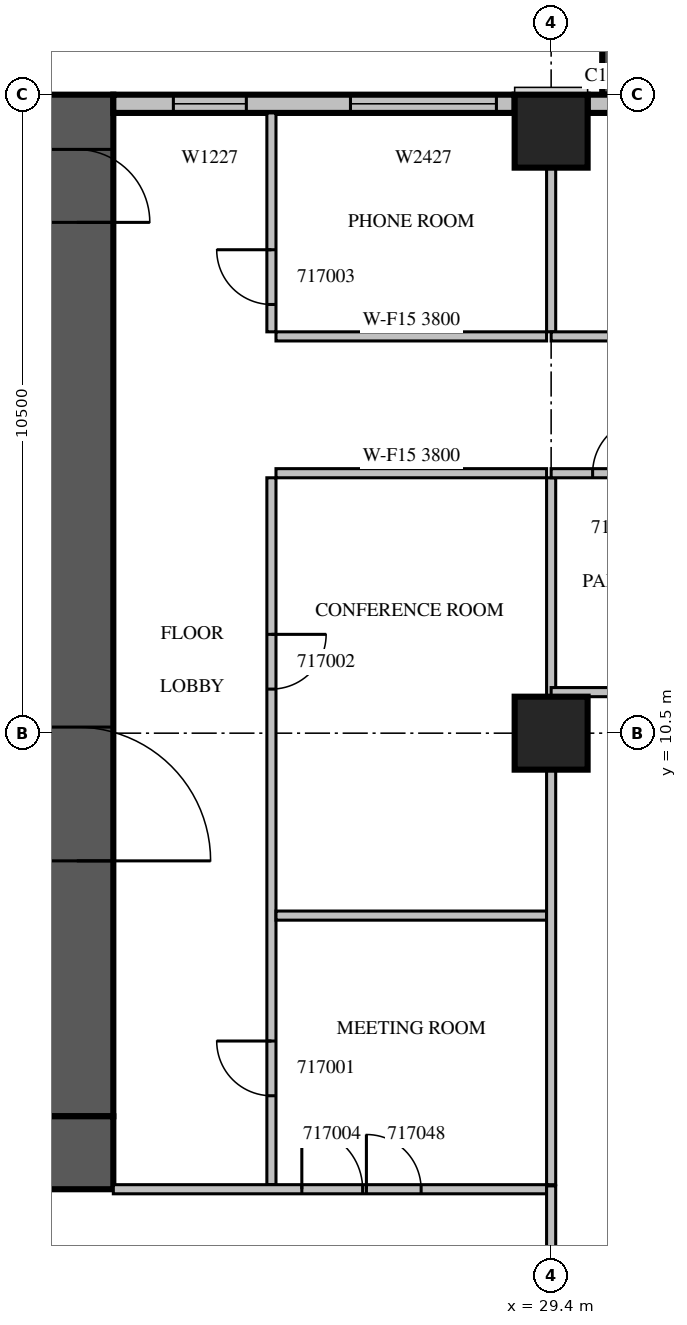
"""IFC4 building model, lengths in metres.
Left out: names, types, materials, properties, quantities, classifications, styles, units other than length and angle.
Written with IfcOpenShell. Run it as: python <this file> out.ifc"""

import sys

from ifc_helpers import new_model, si_unit, direction, frame, frame_2d, origin, origin_2d, place, context, subcontext, project, spatial, rectangle, extrude, source, transform, mapped, element, fill, save


model = new_model("IFC4")
c1 = context("Model", 3, precision=1e-05, world=origin(), true_north=direction((0.0, 1.0)))
c2 = subcontext(c1, "Body", "Model", "MODEL_VIEW")
j1 = project(units=[si_unit("LENGTHUNIT", "METRE"), si_unit("PLANEANGLEUNIT", "RADIAN")], contexts=[c1])
p1 = place(None, origin())
s1 = spatial("IfcSite", under=j1, at=p1, CompositionType="ELEMENT")
p2 = place(p1, origin())
s2 = spatial("IfcBuilding", under=s1, at=p2, CompositionType="ELEMENT")
p3 = place(p2, frame((0.0, 0.0, 82.5)))
s3 = spatial("IfcBuildingStorey", under=s2, at=p3, CompositionType="ELEMENT", Elevation=82.5)
m1 = source(origin(), c2, "Body", "SweptSolid", [
    extrude(rectangle(XDim=1.2, YDim=1.2, at=origin_2d()), origin(), (0.0, 0.0, 1.0), 4.2),
])
for number, where, z_axis, x_axis in (
    (1, (29.4, 10.5, 0.0), (0.0, 0.0, 1.0), (1.0, 0.0, 0.0)),
    (2, (29.4, 20.4, 0.0), (0.0, 0.0, 1.0), (1.0, 0.0, 0.0)),
):
    element("IfcColumn", number, at=place(p3, frame(where, z_axis=z_axis, x_axis=x_axis)), inside=s3, PredefinedType="COLUMN", context=c2, shape_type="MappedRepresentation", body=[
        mapped(m1, transform((0.0, 0.0, 0.0), scale=1.0)),
    ])
m2 = source(origin(), c2, "Body", "SweptSolid", [
    extrude(rectangle(XDim=16.8, YDim=1.2, at=frame_2d((8.4, 0.0))), origin(), (0.0, 0.0, 1.0), 4.2),
])
p4 = place(p3, frame((21.6, 4.2, 0.0), z_axis=(0.0, 0.0, 1.0), x_axis=(0.0, 1.0, 0.0)))
e3 = element("IfcWall", 3, at=p4, inside=s3, PredefinedType="SHEAR", context=c2, shape_type="MappedRepresentation", body=[
    mapped(m2, transform((0.0, 0.0, 0.0), scale=1.0)),
])
m3 = source(origin(), c2, "Body", "SweptSolid", [
    extrude(rectangle(XDim=2.2, YDim=2.1, at=frame_2d((1.1, 1.05))), frame((0.0, 0.61, 0.0), z_axis=(0.0, -1.0, 0.0), x_axis=(1.0, 0.0, 0.0)), (0.0, 0.0, 1.0), 1.22),
])
p5 = place(p4, frame((4.2, 0.0, 0.0)))
e4 = element("IfcOpeningElement", 4, at=p5, cuts=e3, PredefinedType="OPENING", context=c2, shape_type="MappedRepresentation", body=[
    mapped(m3, transform((0.0, 0.0, 0.0), scale=1.0)),
])
m4 = source(origin(), c2, "Body", "SweptSolid", [
    extrude(rectangle(XDim=1.2, YDim=2.1, at=frame_2d((0.6, 1.05))), frame((0.0, 0.61, 0.0), z_axis=(0.0, -1.0, 0.0), x_axis=(1.0, 0.0, 0.0)), (0.0, 0.0, 1.0), 1.22),
])
p6 = place(p4, frame((14.7, 0.0, 0.0)))
e5 = element("IfcOpeningElement", 5, at=p6, cuts=e3, PredefinedType="OPENING", context=c2, shape_type="MappedRepresentation", body=[
    mapped(m4, transform((0.0, 0.0, 0.0), scale=1.0)),
])
m5 = source(origin(), c2, "Body", "SweptSolid", [
    extrude(rectangle(XDim=18.0, YDim=1.2, at=frame_2d((9.0, 0.0))), origin(), (0.0, 0.0, 1.0), 4.2),
])
p7 = place(p3, frame((4.2, 3.6, 0.0), z_axis=(0.0, 0.0, 1.0), x_axis=(1.0, 0.0, 0.0)))
e6 = element("IfcWall", 6, at=p7, inside=s3, PredefinedType="SHEAR", context=c2, shape_type="MappedRepresentation", body=[
    mapped(m5, transform((0.0, 0.0, 0.0), scale=1.0)),
])
m6 = source(origin(), c2, "Body", "SweptSolid", [
    extrude(rectangle(XDim=3.9, YDim=0.2, at=frame_2d((1.95, 0.0))), origin(), (0.0, 0.0, 1.0), 3.8),
])
p8 = place(p3, frame((30.34, 21.0, 0.0), z_axis=(0.0, 0.0, 1.0), x_axis=(0.0, 1.0, 0.0)))
e7 = element("IfcWall", 7, at=p8, inside=s3, PredefinedType="SOLIDWALL", context=c2, shape_type="MappedRepresentation", body=[
    mapped(m6, transform((0.0, 0.0, 0.0), scale=1.0)),
])
m7 = source(origin(), c2, "Body", "SweptSolid", [
    extrude(rectangle(XDim=2.4, YDim=2.7, at=frame_2d((1.2, 1.35))), frame((0.0, 0.11, 0.0), z_axis=(0.0, -1.0, 0.0), x_axis=(1.0, 0.0, 0.0)), (0.0, 0.0, 1.0), 0.22),
])
p9 = place(p8, frame((0.75, 0.0, 0.6)))
e8 = element("IfcOpeningElement", 8, at=p9, cuts=e7, PredefinedType="OPENING", context=c2, shape_type="MappedRepresentation", body=[
    mapped(m7, transform((0.0, 0.0, 0.0), scale=1.0)),
])
m8 = source(origin(), c2, "Body", "SweptSolid", [
    extrude(rectangle(XDim=7.2, YDim=0.3, at=frame_2d((3.6, 0.0))), origin(), (0.0, 0.0, 1.0), 3.8),
])
p10 = place(p3, frame((37.2, 20.85, 0.0), z_axis=(0.0, 0.0, 1.0), x_axis=(-1.0, 0.0, 0.0)))
e9 = element("IfcWall", 9, at=p10, inside=s3, PredefinedType="STANDARD", context=c2, shape_type="MappedRepresentation", body=[
    mapped(m8, transform((0.0, 0.0, 0.0), scale=1.0)),
])
m9 = source(origin(), c2, "Body", "SweptSolid", [
    extrude(rectangle(XDim=1.0, YDim=2.1, at=frame_2d((0.5, 1.05))), frame((0.0, 0.16, 0.0), z_axis=(0.0, -1.0, 0.0), x_axis=(1.0, 0.0, 0.0)), (0.0, 0.0, 1.0), 0.32),
])
p11 = place(p10, frame((5.06, 0.0, 0.0)))
e10 = element("IfcOpeningElement", 10, at=p11, cuts=e9, PredefinedType="OPENING", context=c2, shape_type="MappedRepresentation", body=[
    mapped(m9, transform((0.0, 0.0, 0.0), scale=1.0)),
])
m10 = source(origin(), c2, "Body", "SweptSolid", [
    extrude(rectangle(XDim=6.6, YDim=0.3, at=frame_2d((3.3, 0.0))), origin(), (0.0, 0.0, 1.0), 3.8),
])
p12 = place(p3, frame((28.8, 20.85, 0.0), z_axis=(0.0, 0.0, 1.0), x_axis=(-1.0, 0.0, 0.0)))
e11 = element("IfcWall", 11, at=p12, inside=s3, PredefinedType="STANDARD", context=c2, shape_type="MappedRepresentation", body=[
    mapped(m10, transform((0.0, 0.0, 0.0), scale=1.0)),
])
m11 = source(origin(), c2, "Body", "SweptSolid", [
    extrude(rectangle(XDim=2.4, YDim=2.7, at=frame_2d((1.2, 1.35))), frame((0.0, 0.16, 0.0), z_axis=(0.0, -1.0, 0.0), x_axis=(1.0, 0.0, 0.0)), (0.0, 0.0, 1.0), 0.32),
])
p13 = place(p12, frame((0.3, 0.0, 0.6)))
e12 = element("IfcOpeningElement", 12, at=p13, cuts=e11, PredefinedType="OPENING", context=c2, shape_type="MappedRepresentation", body=[
    mapped(m11, transform((0.0, 0.0, 0.0), scale=1.0)),
])
m12 = source(origin(), c2, "Body", "SweptSolid", [
    extrude(rectangle(XDim=1.2, YDim=2.7, at=frame_2d((0.6, 1.35))), frame((0.0, 0.16, 0.0), z_axis=(0.0, -1.0, 0.0), x_axis=(1.0, 0.0, 0.0)), (0.0, 0.0, 1.0), 0.32),
])
p14 = place(p12, frame((4.412, 0.0, 0.6)))
e13 = element("IfcOpeningElement", 13, at=p14, cuts=e11, PredefinedType="OPENING", context=c2, shape_type="MappedRepresentation", body=[
    mapped(m12, transform((0.0, 0.0, 0.0), scale=1.0)),
])
m13 = source(origin(), c2, "Body", "SweptSolid", [
    extrude(rectangle(XDim=11.625, YDim=0.15, at=frame_2d((5.812, 0.0))), origin(), (0.0, 0.0, 1.0), 3.8),
])
p15 = place(p3, frame((24.8, 14.7, 0.0), z_axis=(0.0, 0.0, 1.0), x_axis=(0.0, -1.0, 0.0)))
e14 = element("IfcWall", 14, at=p15, inside=s3, PredefinedType="PARTITIONING", context=c2, shape_type="MappedRepresentation", body=[
    mapped(m13, transform((0.0, 0.0, 0.0), scale=1.0)),
])
m14 = source(origin(), c2, "Body", "SweptSolid", [
    extrude(rectangle(XDim=0.9, YDim=2.1, at=frame_2d((0.45, 1.05))), frame((0.0, 0.085, 0.0), z_axis=(0.0, -1.0, 0.0), x_axis=(1.0, 0.0, 0.0)), (0.0, 0.0, 1.0), 0.17),
])
p16 = place(p15, frame((9.262, 0.0, 0.0)))
e15 = element("IfcOpeningElement", 15, at=p16, cuts=e14, PredefinedType="OPENING", context=c2, shape_type="MappedRepresentation", body=[
    mapped(m14, transform((0.0, 0.0, 0.0), scale=1.0)),
])
p17 = place(p15, frame((2.575, 0.0, 0.0)))
e16 = element("IfcOpeningElement", 16, at=p17, cuts=e14, PredefinedType="OPENING", context=c2, shape_type="MappedRepresentation", body=[
    mapped(m14, transform((0.0, 0.0, 0.0), scale=1.0)),
])
m15 = source(origin(), c2, "Body", "SweptSolid", [
    extrude(rectangle(XDim=3.6, YDim=0.15, at=frame_2d((1.8, 0.0))), origin(), (0.0, 0.0, 1.0), 3.8),
])
p18 = place(p3, frame((24.8, 20.7, 0.0), z_axis=(0.0, 0.0, 1.0), x_axis=(0.0, -1.0, 0.0)))
e17 = element("IfcWall", 17, at=p18, inside=s3, PredefinedType="PARTITIONING", context=c2, shape_type="MappedRepresentation", body=[
    mapped(m15, transform((0.0, 0.0, 0.0), scale=1.0)),
])
p19 = place(p18, frame((2.25, 0.0, 0.0)))
e18 = element("IfcOpeningElement", 18, at=p19, cuts=e17, PredefinedType="OPENING", context=c2, shape_type="MappedRepresentation", body=[
    mapped(m14, transform((0.0, 0.0, 0.0), scale=1.0)),
])
m16 = source(origin(), c2, "Body", "SweptSolid", [
    extrude(rectangle(XDim=4.45, YDim=0.15, at=frame_2d((2.225, 0.0))), origin(), (0.0, 0.0, 1.0), 3.8),
])
for number, where, z_axis, x_axis in (
    (19, (29.325, 7.5, 0.0), (0.0, 0.0, 1.0), (-1.0, 0.0, 0.0)),
    (20, (29.325, 14.775, 0.0), (0.0, 0.0, 1.0), (-1.0, 0.0, 0.0)),
    (21, (24.875, 17.025, 0.0), (0.0, 0.0, 1.0), (1.0, 0.0, 0.0)),
):
    element("IfcWall", number, at=place(p3, frame(where, z_axis=z_axis, x_axis=x_axis)), inside=s3, PredefinedType="PARTITIONING", context=c2, shape_type="MappedRepresentation", body=[
        mapped(m16, transform((0.0, 0.0, 0.0), scale=1.0)),
    ])
m17 = source(origin(), c2, "Body", "SweptSolid", [
    extrude(rectangle(XDim=6.826, YDim=0.15, at=frame_2d((3.413, 0.0))), origin(), (0.0, 0.0, 1.0), 3.8),
])
p20 = place(p3, frame((29.4, 3.075, 0.0), z_axis=(0.0, 0.0, 1.0), x_axis=(0.0, 1.0, 0.0)))
e22 = element("IfcWall", 22, at=p20, inside=s3, PredefinedType="PARTITIONING", context=c2, shape_type="MappedRepresentation", body=[
    mapped(m17, transform((0.0, 0.0, 0.0), scale=1.0)),
])
m18 = source(origin(), c2, "Body", "SweptSolid", [
    extrude(rectangle(XDim=3.601, YDim=0.15, at=frame_2d((1.8, 0.0))), origin(), (0.0, 0.0, 1.0), 3.8),
])
p21 = place(p3, frame((29.4, 11.099, 0.0), z_axis=(0.0, 0.0, 1.0), x_axis=(0.0, 1.0, 0.0)))
e23 = element("IfcWall", 23, at=p21, inside=s3, PredefinedType="PARTITIONING", context=c2, shape_type="MappedRepresentation", body=[
    mapped(m18, transform((0.0, 0.0, 0.0), scale=1.0)),
])
m19 = source(origin(), c2, "Body", "SweptSolid", [
    extrude(rectangle(XDim=2.701, YDim=0.15, at=frame_2d((1.351, 0.0))), origin(), (0.0, 0.0, 1.0), 3.8),
])
p22 = place(p3, frame((29.4, 17.1, 0.0), z_axis=(0.0, 0.0, 1.0), x_axis=(0.0, 1.0, 0.0)))
e24 = element("IfcWall", 24, at=p22, inside=s3, PredefinedType="PARTITIONING", context=c2, shape_type="MappedRepresentation", body=[
    mapped(m19, transform((0.0, 0.0, 0.0), scale=1.0)),
])
m20 = source(origin(), c2, "Body", "SweptSolid", [
    extrude(rectangle(XDim=7.125, YDim=0.15, at=frame_2d((3.562, 0.0))), origin(), (0.0, 0.0, 1.0), 3.8),
])
p23 = place(p3, frame((22.2, 3.0, 0.0), z_axis=(0.0, 0.0, 1.0), x_axis=(1.0, 0.0, 0.0)))
e25 = element("IfcWall", 25, at=p23, inside=s3, PredefinedType="PARTITIONING", context=c2, shape_type="MappedRepresentation", body=[
    mapped(m20, transform((0.0, 0.0, 0.0), scale=1.0)),
])
m21 = source(origin(), c2, "Body", "SweptSolid", [
    extrude(rectangle(XDim=1.0, YDim=2.1, at=frame_2d((0.5, 1.05))), frame((0.0, 0.085, 0.0), z_axis=(0.0, -1.0, 0.0), x_axis=(1.0, 0.0, 0.0)), (0.0, 0.0, 1.0), 0.17),
])
p24 = place(p23, frame((3.1, 0.0, 0.0)))
e26 = element("IfcOpeningElement", 26, at=p24, cuts=e25, PredefinedType="OPENING", context=c2, shape_type="MappedRepresentation", body=[
    mapped(m21, transform((0.0, 0.0, 0.0), scale=1.0)),
])
p25 = place(p23, frame((4.162, 0.0, 0.0)))
e27 = element("IfcOpeningElement", 27, at=p25, cuts=e25, PredefinedType="OPENING", context=c2, shape_type="MappedRepresentation", body=[
    mapped(m14, transform((0.0, 0.0, 0.0), scale=1.0)),
])
m22 = source(origin(), c2, "Body", "SweptSolid", [
    extrude(rectangle(XDim=1.856, YDim=0.15, at=frame_2d((0.928, 0.0))), origin(), (0.0, 0.0, 1.0), 3.8),
])
p26 = place(p3, frame((29.4, 1.199, 0.0), z_axis=(0.0, 0.0, 1.0), x_axis=(0.0, 1.0, 0.0)))
e28 = element("IfcWall", 28, at=p26, inside=s3, PredefinedType="PARTITIONING", context=c2, shape_type="MappedRepresentation", body=[
    mapped(m22, transform((0.0, 0.0, 0.0), scale=1.0)),
])
m23 = source(origin(), c2, "Body", "SweptSolid", [
    extrude(rectangle(XDim=8.4, YDim=0.15, at=frame_2d((4.2, 0.0))), origin(), (0.0, 0.0, 1.0), 3.8),
])
p27 = place(p3, frame((37.8, 11.175, 0.0), z_axis=(0.0, 0.0, 1.0), x_axis=(-1.0, 0.0, 0.0)))
e29 = element("IfcWall", 29, at=p27, inside=s3, PredefinedType="PARTITIONING", context=c2, shape_type="MappedRepresentation", body=[
    mapped(m23, transform((0.0, 0.0, 0.0), scale=1.0)),
])
m24 = source(origin(), c2, "Body", "SweptSolid", [
    extrude(rectangle(XDim=1.1, YDim=2.1, at=frame_2d((0.55, 1.05))), frame((0.0, 0.085, 0.0), z_axis=(0.0, -1.0, 0.0), x_axis=(1.0, 0.0, 0.0)), (0.0, 0.0, 1.0), 0.17),
])
p28 = place(p27, frame((1.379, 0.0, 0.0)))
e30 = element("IfcOpeningElement", 30, at=p28, cuts=e29, PredefinedType="OPENING", context=c2, shape_type="MappedRepresentation", body=[
    mapped(m24, transform((0.0, 0.0, 0.0), scale=1.0)),
])
p29 = place(p3, frame((37.8, 14.775, 0.0), z_axis=(0.0, 0.0, 1.0), x_axis=(-1.0, 0.0, 0.0)))
e31 = element("IfcWall", 31, at=p29, inside=s3, PredefinedType="PARTITIONING", context=c2, shape_type="MappedRepresentation", body=[
    mapped(m23, transform((0.0, 0.0, 0.0), scale=1.0)),
])
p30 = place(p29, frame((1.115, 0.0, 0.0)))
e32 = element("IfcOpeningElement", 32, at=p30, cuts=e31, PredefinedType="OPENING", context=c2, shape_type="MappedRepresentation", body=[
    mapped(m24, transform((0.0, 0.0, 0.0), scale=1.0)),
])
p31 = place(p29, frame((6.818, 0.0, 0.0)))
e33 = element("IfcOpeningElement", 33, at=p31, cuts=e31, PredefinedType="OPENING", context=c2, shape_type="MappedRepresentation", body=[
    mapped(m14, transform((0.0, 0.0, 0.0), scale=1.0)),
])
p32 = place(p29, frame((4.282, 0.0, 0.0)))
e34 = element("IfcOpeningElement", 34, at=p32, cuts=e31, PredefinedType="OPENING", context=c2, shape_type="MappedRepresentation", body=[
    mapped(m14, transform((0.0, 0.0, 0.0), scale=1.0)),
])
m25 = source(origin(), c2, "Body", "SweptSolid", [
    extrude(rectangle(XDim=37.5, YDim=0.15, at=frame_2d((18.75, 0.0))), origin(), (0.0, 0.0, 1.0), 3.8),
])
p33 = place(p3, frame((29.4, 17.025, 0.0), z_axis=(0.0, 0.0, 1.0), x_axis=(1.0, 0.0, 0.0)))
e35 = element("IfcWall", 35, at=p33, inside=s3, PredefinedType="PARTITIONING", context=c2, shape_type="MappedRepresentation", body=[
    mapped(m25, transform((0.0, 0.0, 0.0), scale=1.0)),
])
p34 = place(p33, frame((1.357, 0.0, 0.0)))
e36 = element("IfcOpeningElement", 36, at=p34, cuts=e35, PredefinedType="OPENING", context=c2, shape_type="MappedRepresentation", body=[
    mapped(m21, transform((0.0, 0.0, 0.0), scale=1.0)),
])
p35 = place(p33, frame((4.669, 0.0, 0.0)))
e37 = element("IfcOpeningElement", 37, at=p35, cuts=e35, PredefinedType="OPENING", context=c2, shape_type="MappedRepresentation", body=[
    mapped(m21, transform((0.0, 0.0, 0.0), scale=1.0)),
])
p36 = place(p33, frame((7.012, 0.0, 0.0)))
e38 = element("IfcOpeningElement", 38, at=p36, cuts=e35, PredefinedType="OPENING", context=c2, shape_type="MappedRepresentation", body=[
    mapped(m21, transform((0.0, 0.0, 0.0), scale=1.0)),
])
p37 = place(p33, frame((12.1, 0.0, 0.0)))
e39 = element("IfcOpeningElement", 39, at=p37, cuts=e35, PredefinedType="OPENING", context=c2, shape_type="MappedRepresentation", body=[
    mapped(m21, transform((0.0, 0.0, 0.0), scale=1.0)),
])
p38 = place(p33, frame((18.898, 0.0, 0.0)))
e40 = element("IfcOpeningElement", 40, at=p38, cuts=e35, PredefinedType="OPENING", context=c2, shape_type="MappedRepresentation", body=[
    mapped(m21, transform((0.0, 0.0, 0.0), scale=1.0)),
])
p39 = place(p33, frame((23.543, 0.0, 0.0)))
e41 = element("IfcOpeningElement", 41, at=p39, cuts=e35, PredefinedType="OPENING", context=c2, shape_type="MappedRepresentation", body=[
    mapped(m21, transform((0.0, 0.0, 0.0), scale=1.0)),
])
p40 = place(p33, frame((26.826, 0.0, 0.0)))
e42 = element("IfcOpeningElement", 42, at=p40, cuts=e35, PredefinedType="OPENING", context=c2, shape_type="MappedRepresentation", body=[
    mapped(m21, transform((0.0, 0.0, 0.0), scale=1.0)),
])
m26 = source(origin(), c2, "Body", "SweptSolid", [
    extrude(rectangle(XDim=1.2, YDim=2.1, at=frame_2d((0.6, 1.05))), frame((0.0, 0.085, 0.0), z_axis=(0.0, -1.0, 0.0), x_axis=(1.0, 0.0, 0.0)), (0.0, 0.0, 1.0), 0.17),
])
p41 = place(p33, frame((30.214, 0.0, 0.0)))
e43 = element("IfcOpeningElement", 43, at=p41, cuts=e35, PredefinedType="OPENING", context=c2, shape_type="MappedRepresentation", body=[
    mapped(m26, transform((0.0, 0.0, 0.0), scale=1.0)),
])
p42 = place(p33, frame((34.721, 0.0, 0.0)))
e44 = element("IfcOpeningElement", 44, at=p42, cuts=e35, PredefinedType="OPENING", context=c2, shape_type="MappedRepresentation", body=[
    mapped(m26, transform((0.0, 0.0, 0.0), scale=1.0)),
])
m27 = source(origin(), c2, "Body", "SweptSolid", [
    extrude(rectangle(XDim=2.4, YDim=2.7, at=frame_2d((1.2, 1.35))), frame((0.0, 0.03, 0.0), z_axis=(0.0, -1.0, 0.0), x_axis=(1.0, 0.0, 0.0)), (0.0, 0.0, 1.0), 0.06),
])
p43 = place(p13, origin())
e45 = element("IfcWindow", 45, at=p43, inside=s3, PartitioningType="SINGLE_PANEL", PredefinedType="WINDOW", context=c2, shape_type="MappedRepresentation", body=[
    mapped(m27, transform((0.0, 0.0, 0.0), scale=1.0)),
])
fill(e12, e45)
m28 = source(origin(), c2, "Body", "SweptSolid", [
    extrude(rectangle(XDim=1.2, YDim=2.7, at=frame_2d((0.6, 1.35))), frame((0.0, 0.03, 0.0), z_axis=(0.0, -1.0, 0.0), x_axis=(1.0, 0.0, 0.0)), (0.0, 0.0, 1.0), 0.06),
])
p44 = place(p14, origin())
e46 = element("IfcWindow", 46, at=p44, inside=s3, PartitioningType="SINGLE_PANEL", PredefinedType="WINDOW", context=c2, shape_type="MappedRepresentation", body=[
    mapped(m28, transform((0.0, 0.0, 0.0), scale=1.0)),
])
fill(e13, e46)
m29 = source(origin(), c2, "Body", "SweptSolid", [
    extrude(rectangle(XDim=2.2, YDim=2.1, at=frame_2d((1.1, 1.05))), frame((0.0, 0.025, 0.0), z_axis=(0.0, -1.0, 0.0), x_axis=(1.0, 0.0, 0.0)), (0.0, 0.0, 1.0), 0.05),
])
p45 = place(p5, origin())
e47 = element("IfcDoor", 47, at=p45, inside=s3, OperationType="DOUBLE_DOOR_SINGLE_SWING", PredefinedType="DOOR", context=c2, shape_type="MappedRepresentation", body=[
    mapped(m29, transform((0.0, 0.0, 0.0), scale=1.0)),
])
fill(e4, e47)
m30 = source(origin(), c2, "Body", "SweptSolid", [
    extrude(rectangle(XDim=1.2, YDim=2.1, at=frame_2d((0.6, 1.05))), frame((0.0, 0.025, 0.0), z_axis=(0.0, -1.0, 0.0), x_axis=(1.0, 0.0, 0.0)), (0.0, 0.0, 1.0), 0.05),
])
p46 = place(p6, origin())
e48 = element("IfcDoor", 48, at=p46, inside=s3, OperationType="SINGLE_SWING_RIGHT", PredefinedType="DOOR", context=c2, shape_type="MappedRepresentation", body=[
    mapped(m30, transform((0.0, 0.0, 0.0), scale=1.0)),
])
fill(e5, e48)
m31 = source(origin(), c2, "Body", "SweptSolid", [
    extrude(rectangle(XDim=0.9, YDim=2.1, at=frame_2d((0.45, 1.05))), frame((0.0, 0.025, 0.0), z_axis=(0.0, -1.0, 0.0), x_axis=(1.0, 0.0, 0.0)), (0.0, 0.0, 1.0), 0.05),
])
p47 = place(p16, origin())
e49 = element("IfcDoor", 49, at=p47, inside=s3, OperationType="SINGLE_SWING_RIGHT", PredefinedType="DOOR", context=c2, shape_type="MappedRepresentation", body=[
    mapped(m31, transform((0.0, 0.0, 0.0), scale=1.0)),
])
fill(e15, e49)
p48 = place(p17, origin())
e50 = element("IfcDoor", 50, at=p48, inside=s3, OperationType="SINGLE_SWING_LEFT", PredefinedType="DOOR", context=c2, shape_type="MappedRepresentation", body=[
    mapped(m31, transform((0.0, 0.0, 0.0), scale=1.0)),
])
fill(e16, e50)
p49 = place(p19, origin())
e51 = element("IfcDoor", 51, at=p49, inside=s3, OperationType="SINGLE_SWING_RIGHT", PredefinedType="DOOR", context=c2, shape_type="MappedRepresentation", body=[
    mapped(m31, transform((0.0, 0.0, 0.0), scale=1.0)),
])
fill(e18, e51)
m32 = source(origin(), c2, "Body", "SweptSolid", [
    extrude(rectangle(XDim=1.0, YDim=2.1, at=frame_2d((0.5, 1.05))), frame((0.0, 0.025, 0.0), z_axis=(0.0, -1.0, 0.0), x_axis=(1.0, 0.0, 0.0)), (0.0, 0.0, 1.0), 0.05),
])
p50 = place(p24, origin())
e52 = element("IfcDoor", 52, at=p50, inside=s3, OperationType="SINGLE_SWING_LEFT", PredefinedType="DOOR", context=c2, shape_type="MappedRepresentation", body=[
    mapped(m32, transform((0.0, 0.0, 0.0), scale=1.0)),
])
fill(e26, e52)
p51 = place(p31, origin())
e53 = element("IfcDoor", 53, at=p51, inside=s3, OperationType="SINGLE_SWING_RIGHT", PredefinedType="DOOR", context=c2, shape_type="MappedRepresentation", body=[
    mapped(m31, transform((0.0, 0.0, 0.0), scale=1.0)),
])
fill(e33, e53)
p52 = place(p25, origin())
e54 = element("IfcDoor", 54, at=p52, inside=s3, OperationType="SINGLE_SWING_LEFT", PredefinedType="DOOR", context=c2, shape_type="MappedRepresentation", body=[
    mapped(m31, transform((0.0, 0.0, 0.0), scale=1.0)),
])
fill(e27, e54)
save(model, sys.argv[1])
